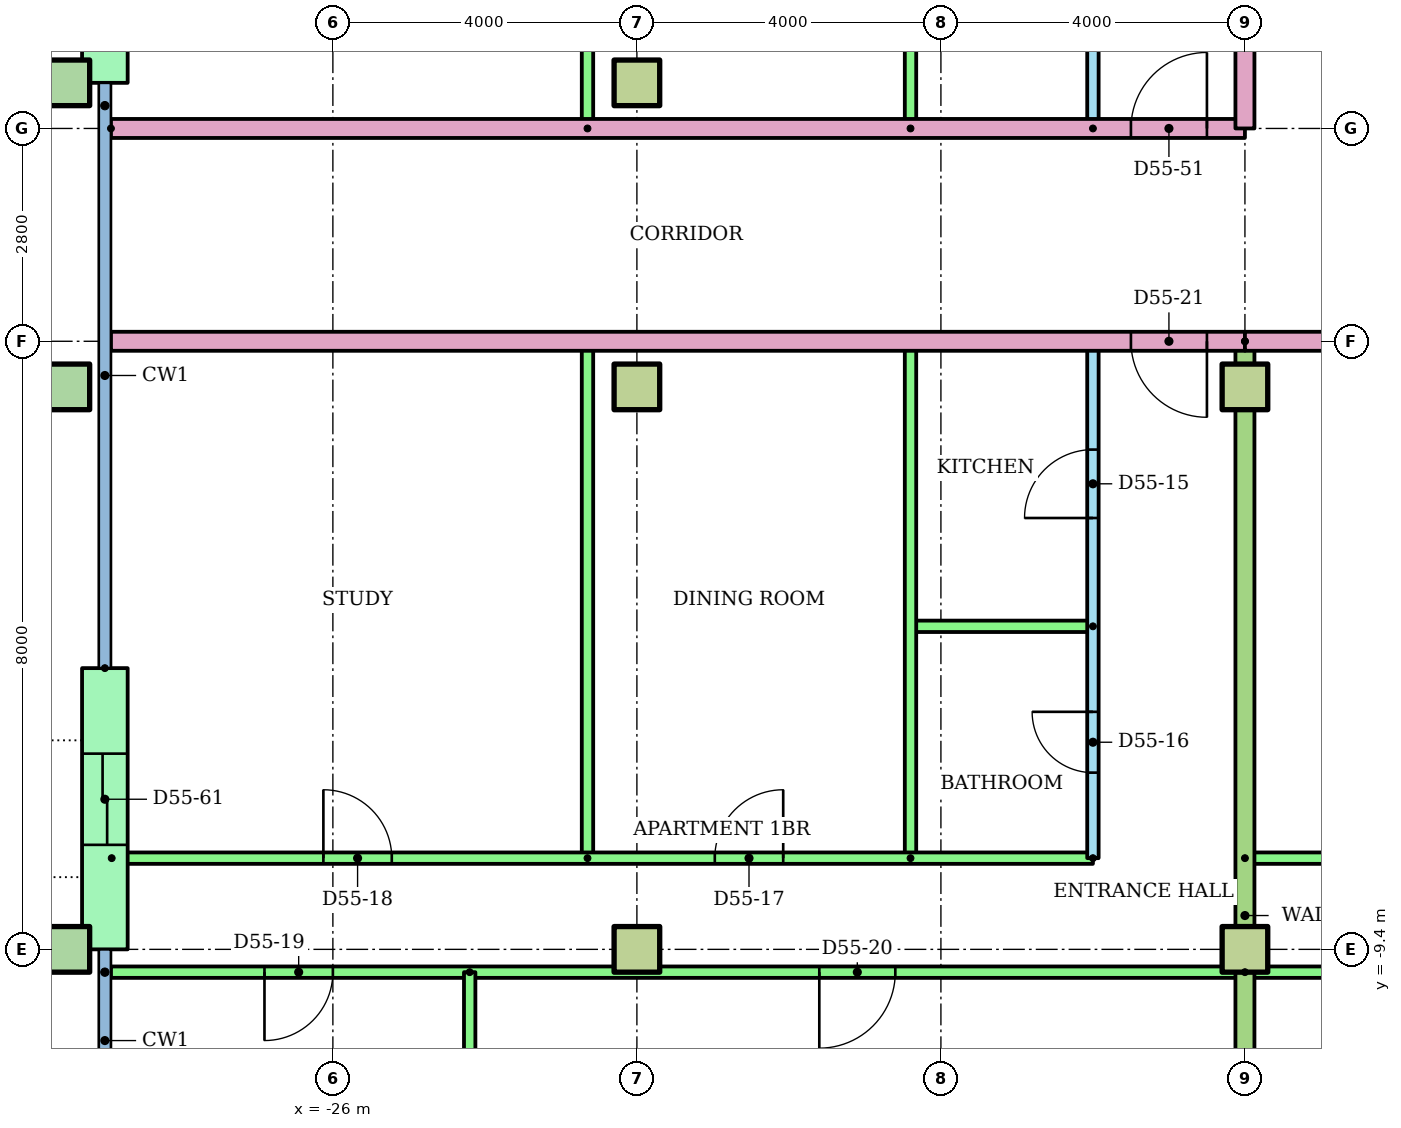
"""IFC4 building model, lengths in metres.
Left out: names, types, materials, properties, quantities, classifications, styles, units other than length and angle.
Written with IfcOpenShell. Run it as: python <this file> out.ifc"""

import sys

from ifc_helpers import new_model, si_unit, direction, frame, frame_2d, origin, origin_2d, place, context, subcontext, project, spatial, rectangle, hollow_rectangle, extrude, element, fill, save


model = new_model("IFC4")
c1 = context("Model", 3, precision=1e-05, world=origin(), true_north=direction((0.0, 1.0)))
c2 = subcontext(c1, "Body", "Model", "MODEL_VIEW")
j1 = project(units=[si_unit("LENGTHUNIT", "METRE"), si_unit("PLANEANGLEUNIT", "RADIAN")], contexts=[c1])
p1 = place(None, origin())
s1 = spatial("IfcSite", under=j1, at=p1, CompositionType="ELEMENT")
p2 = place(p1, origin())
s2 = spatial("IfcBuilding", under=s1, at=p2, CompositionType="ELEMENT")
p3 = place(p2, frame((0.0, 0.0, 214.0)))
s3 = spatial("IfcBuildingStorey", under=s2, at=p3, CompositionType="ELEMENT", Elevation=214.0)
p4 = place(p3, frame((-29.5, -9.4, 0.0)))
e1 = element("IfcColumn", 1, at=p4, inside=s3, PredefinedType="COLUMN", context=c2, shape_type="SweptSolid", body=[
    extrude(hollow_rectangle(XDim=0.6, YDim=0.6, WallThickness=0.03, at=origin_2d()), origin(), (0.0, 0.0, 1.0), 3.2),
])
for number, where in (
    (2, (-22.0, -9.4, 0.0)),
    (3, (-14.0, -9.4, 0.0)),
):
    element("IfcColumn", number, at=place(p3, frame(where)), inside=s3, PredefinedType="COLUMN", context=c2, shape_type="SweptSolid", body=[
        extrude(rectangle(XDim=0.6, YDim=0.6, at=origin_2d()), origin(), (0.0, 0.0, 1.0), 3.2),
    ])
p5 = place(p3, frame((-29.5, -2.0, 0.0)))
e4 = element("IfcColumn", 4, at=p5, inside=s3, PredefinedType="COLUMN", context=c2, shape_type="SweptSolid", body=[
    extrude(hollow_rectangle(XDim=0.6, YDim=0.6, WallThickness=0.03, at=origin_2d()), origin(), (0.0, 0.0, 1.0), 3.2),
])
for number, where in (
    (5, (-22.0, -2.0, 0.0)),
    (6, (-14.0, -2.0, 0.0)),
):
    element("IfcColumn", number, at=place(p3, frame(where)), inside=s3, PredefinedType="COLUMN", context=c2, shape_type="SweptSolid", body=[
        extrude(rectangle(XDim=0.6, YDim=0.6, at=origin_2d()), origin(), (0.0, 0.0, 1.0), 3.2),
    ])
p6 = place(p3, frame((-29.5, 2.0, 0.0)))
e7 = element("IfcColumn", 7, at=p6, inside=s3, PredefinedType="COLUMN", context=c2, shape_type="SweptSolid", body=[
    extrude(hollow_rectangle(XDim=0.6, YDim=0.6, WallThickness=0.03, at=origin_2d()), origin(), (0.0, 0.0, 1.0), 3.2),
])
p7 = place(p3, frame((-22.0, 2.0, 0.0)))
e8 = element("IfcColumn", 8, at=p7, inside=s3, PredefinedType="COLUMN", context=c2, shape_type="SweptSolid", body=[
    extrude(rectangle(XDim=0.6, YDim=0.6, at=origin_2d()), origin(), (0.0, 0.0, 1.0), 3.2),
])
p8 = place(p3, frame((-29.0, 6.5, 0.0), z_axis=(0.0, 0.0, 1.0), x_axis=(0.0, -1.0, 0.0)))
e9 = element("IfcWall", 9, at=p8, inside=s3, PredefinedType="STANDARD", context=c2, shape_type="SweptSolid", body=[
    extrude(rectangle(XDim=4.5, YDim=0.6, at=frame_2d((2.25, 0.0))), origin(), (0.0, 0.0, 1.0), 2.92),
])
p9 = place(p8, frame((1.65, 0.0, 0.0)))
e10 = element("IfcOpeningElement", 10, at=p9, cuts=e9, PredefinedType="OPENING", context=c2, shape_type="SweptSolid", body=[
    extrude(rectangle(XDim=1.2, YDim=2.1, at=frame_2d((0.6, 1.05))), frame((0.0, 0.31, 0.0), z_axis=(0.0, -1.0, 0.0), x_axis=(1.0, 0.0, 0.0)), (0.0, 0.0, 1.0), 0.62),
])
p10 = place(p3, frame((-29.0, -5.7, 0.0), z_axis=(0.0, 0.0, 1.0), x_axis=(0.0, -1.0, 0.0)))
e11 = element("IfcWall", 11, at=p10, inside=s3, PredefinedType="STANDARD", context=c2, shape_type="SweptSolid", body=[
    extrude(rectangle(XDim=3.7, YDim=0.6, at=frame_2d((1.85, 0.0))), origin(), (0.0, 0.0, 1.0), 2.92),
])
p11 = place(p10, frame((1.125, 0.0, 0.0)))
e12 = element("IfcOpeningElement", 12, at=p11, cuts=e11, PredefinedType="OPENING", context=c2, shape_type="SweptSolid", body=[
    extrude(rectangle(XDim=1.2, YDim=2.1, at=frame_2d((0.6, 1.05))), frame((0.0, 0.31, 0.0), z_axis=(0.0, -1.0, 0.0), x_axis=(1.0, 0.0, 0.0)), (0.0, 0.0, 1.0), 0.62),
])
p12 = place(p3, frame((-16.0, -8.2, 0.0), z_axis=(0.0, 0.0, 1.0), x_axis=(0.0, 1.0, 0.0)))
e13 = element("IfcWall", 13, at=p12, inside=s3, PredefinedType="PARTITIONING", context=c2, shape_type="SweptSolid", body=[
    extrude(rectangle(XDim=6.8, YDim=0.15, at=frame_2d((3.4, 0.0))), origin(), (0.0, 0.0, 1.0), 2.4),
])
p13 = place(p12, frame((4.475, 0.0, 0.0)))
e14 = element("IfcOpeningElement", 14, at=p13, cuts=e13, PredefinedType="OPENING", context=c2, shape_type="SweptSolid", body=[
    extrude(rectangle(XDim=0.9, YDim=2.1, at=frame_2d((0.45, 1.05))), frame((0.0, 0.085, 0.0), z_axis=(0.0, -1.0, 0.0), x_axis=(1.0, 0.0, 0.0)), (0.0, 0.0, 1.0), 0.17),
])
p14 = place(p12, frame((1.125, 0.0, 0.0)))
e15 = element("IfcOpeningElement", 15, at=p14, cuts=e13, PredefinedType="OPENING", context=c2, shape_type="SweptSolid", body=[
    extrude(rectangle(XDim=0.8, YDim=2.1, at=frame_2d((0.4, 1.05))), frame((0.0, 0.085, 0.0), z_axis=(0.0, -1.0, 0.0), x_axis=(1.0, 0.0, 0.0)), (0.0, 0.0, 1.0), 0.17),
])
p15 = place(p3, frame((-16.0, -5.15, 0.0), z_axis=(0.0, 0.0, 1.0), x_axis=(-1.0, 0.0, 0.0)))
e16 = element("IfcWall", 16, at=p15, inside=s3, PredefinedType="PARTITIONING", context=c2, shape_type="SweptSolid", body=[
    extrude(rectangle(XDim=2.4, YDim=0.15, at=frame_2d((1.2, 0.0))), origin(), (0.0, 0.0, 1.0), 2.4),
])
for number, where, z_axis, x_axis in (
    (17, (-18.4, -8.2, 0.0), (0.0, 0.0, 1.0), (0.0, 1.0, 0.0)),
    (18, (-22.65, -8.2, 0.0), (0.0, 0.0, 1.0), (0.0, 1.0, 0.0)),
):
    element("IfcWall", number, at=place(p3, frame(where, z_axis=z_axis, x_axis=x_axis)), inside=s3, PredefinedType="PARTITIONING", context=c2, shape_type="SweptSolid", body=[
        extrude(rectangle(XDim=6.8, YDim=0.15, at=frame_2d((3.4, 0.0))), origin(), (0.0, 0.0, 1.0), 2.4),
    ])
p16 = place(p3, frame((-28.91, -8.2, 0.0)))
e19 = element("IfcWall", 19, at=p16, inside=s3, PredefinedType="PARTITIONING", context=c2, shape_type="SweptSolid", body=[
    extrude(rectangle(XDim=12.91, YDim=0.15, at=frame_2d((6.455, 0.0))), origin(), (0.0, 0.0, 1.0), 2.4),
])
p17 = place(p16, frame((7.935, 0.0, 0.0)))
e20 = element("IfcOpeningElement", 20, at=p17, cuts=e19, PredefinedType="OPENING", context=c2, shape_type="SweptSolid", body=[
    extrude(rectangle(XDim=0.9, YDim=2.1, at=frame_2d((0.45, 1.05))), frame((0.0, 0.085, 0.0), z_axis=(0.0, -1.0, 0.0), x_axis=(1.0, 0.0, 0.0)), (0.0, 0.0, 1.0), 0.17),
])
p18 = place(p16, frame((2.785, 0.0, 0.0)))
e21 = element("IfcOpeningElement", 21, at=p18, cuts=e19, PredefinedType="OPENING", context=c2, shape_type="SweptSolid", body=[
    extrude(rectangle(XDim=0.9, YDim=2.1, at=frame_2d((0.45, 1.05))), frame((0.0, 0.085, 0.0), z_axis=(0.0, -1.0, 0.0), x_axis=(1.0, 0.0, 0.0)), (0.0, 0.0, 1.0), 0.17),
])
p19 = place(p3, frame((-14.0, -9.7, 0.0), z_axis=(0.0, 0.0, 1.0), x_axis=(-1.0, 0.0, 0.0)))
e22 = element("IfcWall", 22, at=p19, inside=s3, PredefinedType="PARTITIONING", context=c2, shape_type="SweptSolid", body=[
    extrude(rectangle(XDim=14.92, YDim=0.15, at=frame_2d((7.46, 0.0))), origin(), (0.0, 0.0, 1.0), 2.4),
])
p20 = place(p19, frame((12.0, 0.0, 0.0)))
e23 = element("IfcOpeningElement", 23, at=p20, cuts=e22, PredefinedType="OPENING", context=c2, shape_type="SweptSolid", body=[
    extrude(rectangle(XDim=0.9, YDim=2.1, at=frame_2d((0.45, 1.05))), frame((0.0, 0.085, 0.0), z_axis=(0.0, -1.0, 0.0), x_axis=(1.0, 0.0, 0.0)), (0.0, 0.0, 1.0), 0.17),
])
p21 = place(p19, frame((4.6, 0.0, 0.0)))
e24 = element("IfcOpeningElement", 24, at=p21, cuts=e22, PredefinedType="OPENING", context=c2, shape_type="SweptSolid", body=[
    extrude(rectangle(XDim=1.0, YDim=2.1, at=frame_2d((0.5, 1.05))), frame((0.0, 0.085, 0.0), z_axis=(0.0, -1.0, 0.0), x_axis=(1.0, 0.0, 0.0)), (0.0, 0.0, 1.0), 0.17),
])
p22 = place(p3, frame((-24.2, -9.7, 0.0), z_axis=(0.0, 0.0, 1.0), x_axis=(0.0, -1.0, 0.0)))
e25 = element("IfcWall", 25, at=p22, inside=s3, PredefinedType="PARTITIONING", context=c2, shape_type="SweptSolid", body=[
    extrude(rectangle(XDim=5.02, YDim=0.15, at=frame_2d((2.51, 0.0))), origin(), (0.0, 0.0, 1.0), 2.4),
])
p23 = place(p3, frame((-14.0, -8.2, 0.0)))
e26 = element("IfcWall", 26, at=p23, inside=s3, PredefinedType="PARTITIONING", context=c2, shape_type="SweptSolid", body=[
    extrude(rectangle(XDim=22.0, YDim=0.15, at=frame_2d((11.0, 0.0))), origin(), (0.0, 0.0, 1.0), 2.4),
])
p24 = place(p23, frame((14.624, 0.0, 0.0)))
e27 = element("IfcOpeningElement", 27, at=p24, cuts=e26, PredefinedType="OPENING", context=c2, shape_type="SweptSolid", body=[
    extrude(rectangle(XDim=0.9, YDim=2.1, at=frame_2d((0.45, 1.05))), frame((0.0, 0.085, 0.0), z_axis=(0.0, -1.0, 0.0), x_axis=(1.0, 0.0, 0.0)), (0.0, 0.0, 1.0), 0.17),
])
p25 = place(p23, frame((8.476, 0.0, 0.0)))
e28 = element("IfcOpeningElement", 28, at=p25, cuts=e26, PredefinedType="OPENING", context=c2, shape_type="SweptSolid", body=[
    extrude(rectangle(XDim=0.9, YDim=2.1, at=frame_2d((0.45, 1.05))), frame((0.0, 0.085, 0.0), z_axis=(0.0, -1.0, 0.0), x_axis=(1.0, 0.0, 0.0)), (0.0, 0.0, 1.0), 0.17),
])
p26 = place(p23, frame((1.975, 0.0, 0.0)))
e29 = element("IfcOpeningElement", 29, at=p26, cuts=e26, PredefinedType="OPENING", context=c2, shape_type="SweptSolid", body=[
    extrude(rectangle(XDim=0.9, YDim=2.1, at=frame_2d((0.45, 1.05))), frame((0.0, 0.085, 0.0), z_axis=(0.0, -1.0, 0.0), x_axis=(1.0, 0.0, 0.0)), (0.0, 0.0, 1.0), 0.17),
])
p27 = place(p3, frame((10.0, -9.7, 0.0), z_axis=(0.0, 0.0, 1.0), x_axis=(-1.0, 0.0, 0.0)))
e30 = element("IfcWall", 30, at=p27, inside=s3, PredefinedType="PARTITIONING", context=c2, shape_type="SweptSolid", body=[
    extrude(rectangle(XDim=24.0, YDim=0.15, at=frame_2d((12.0, 0.0))), origin(), (0.0, 0.0, 1.0), 2.4),
])
p28 = place(p27, frame((21.55, 0.0, 0.0)))
e31 = element("IfcOpeningElement", 31, at=p28, cuts=e30, PredefinedType="OPENING", context=c2, shape_type="SweptSolid", body=[
    extrude(rectangle(XDim=0.9, YDim=2.1, at=frame_2d((0.45, 1.05))), frame((0.0, 0.085, 0.0), z_axis=(0.0, -1.0, 0.0), x_axis=(1.0, 0.0, 0.0)), (0.0, 0.0, 1.0), 0.17),
])
p29 = place(p27, frame((17.55, 0.0, 0.0)))
e32 = element("IfcOpeningElement", 32, at=p29, cuts=e30, PredefinedType="OPENING", context=c2, shape_type="SweptSolid", body=[
    extrude(rectangle(XDim=0.9, YDim=2.1, at=frame_2d((0.45, 1.05))), frame((0.0, 0.085, 0.0), z_axis=(0.0, -1.0, 0.0), x_axis=(1.0, 0.0, 0.0)), (0.0, 0.0, 1.0), 0.17),
])
p30 = place(p27, frame((11.5, 0.0, 0.0)))
e33 = element("IfcOpeningElement", 33, at=p30, cuts=e30, PredefinedType="OPENING", context=c2, shape_type="SweptSolid", body=[
    extrude(rectangle(XDim=1.0, YDim=2.1, at=frame_2d((0.5, 1.05))), frame((0.0, 0.085, 0.0), z_axis=(0.0, -1.0, 0.0), x_axis=(1.0, 0.0, 0.0)), (0.0, 0.0, 1.0), 0.17),
])
p31 = place(p27, frame((5.55, 0.0, 0.0)))
e34 = element("IfcOpeningElement", 34, at=p31, cuts=e30, PredefinedType="OPENING", context=c2, shape_type="SweptSolid", body=[
    extrude(rectangle(XDim=0.9, YDim=2.1, at=frame_2d((0.45, 1.05))), frame((0.0, 0.085, 0.0), z_axis=(0.0, -1.0, 0.0), x_axis=(1.0, 0.0, 0.0)), (0.0, 0.0, 1.0), 0.17),
])
p32 = place(p27, frame((1.55, 0.0, 0.0)))
e35 = element("IfcOpeningElement", 35, at=p32, cuts=e30, PredefinedType="OPENING", context=c2, shape_type="SweptSolid", body=[
    extrude(rectangle(XDim=0.9, YDim=2.1, at=frame_2d((0.45, 1.05))), frame((0.0, 0.085, 0.0), z_axis=(0.0, -1.0, 0.0), x_axis=(1.0, 0.0, 0.0)), (0.0, 0.0, 1.0), 0.17),
])
p33 = place(p3, frame((-14.0, -1.4, 0.0), z_axis=(0.0, 0.0, 1.0), x_axis=(0.0, -1.0, 0.0)))
e36 = element("IfcWall", 36, at=p33, inside=s3, PredefinedType="PARTITIONING", context=c2, shape_type="SweptSolid", body=[
    extrude(rectangle(XDim=15.11, YDim=0.25, at=frame_2d((7.555, 0.0))), origin(), (0.0, 0.0, 1.0), 2.4),
])
p34 = place(p3, frame((-14.0, -1.4, 0.0), z_axis=(0.0, 0.0, 1.0), x_axis=(-1.0, 0.0, 0.0)))
e37 = element("IfcWall", 37, at=p34, inside=s3, PredefinedType="PARTITIONING", context=c2, shape_type="SweptSolid", body=[
    extrude(rectangle(XDim=14.92, YDim=0.25, at=frame_2d((7.46, 0.0))), origin(), (0.0, 0.0, 1.0), 2.4),
])
p35 = place(p34, frame((0.5, 0.0, 0.0)))
e38 = element("IfcOpeningElement", 38, at=p35, cuts=e37, PredefinedType="OPENING", context=c2, shape_type="SweptSolid", body=[
    extrude(rectangle(XDim=1.0, YDim=2.1, at=frame_2d((0.5, 1.05))), frame((0.0, 0.135, 0.0), z_axis=(0.0, -1.0, 0.0), x_axis=(1.0, 0.0, 0.0)), (0.0, 0.0, 1.0), 0.27),
])
p36 = place(p3, frame((-16.0, 1.4, 0.0), z_axis=(0.0, 0.0, 1.0), x_axis=(0.0, 1.0, 0.0)))
e39 = element("IfcWall", 39, at=p36, inside=s3, PredefinedType="PARTITIONING", context=c2, shape_type="SweptSolid", body=[
    extrude(rectangle(XDim=9.2, YDim=0.15, at=frame_2d((4.6, 0.0))), origin(), (0.0, 0.0, 1.0), 2.4),
])
p37 = place(p36, frame((2.05, 0.0, 0.0)))
e40 = element("IfcOpeningElement", 40, at=p37, cuts=e39, PredefinedType="OPENING", context=c2, shape_type="SweptSolid", body=[
    extrude(rectangle(XDim=0.9, YDim=2.1, at=frame_2d((0.45, 1.05))), frame((0.0, 0.085, 0.0), z_axis=(0.0, -1.0, 0.0), x_axis=(1.0, 0.0, 0.0)), (0.0, 0.0, 1.0), 0.17),
])
p38 = place(p36, frame((6.7, 0.0, 0.0)))
e41 = element("IfcOpeningElement", 41, at=p38, cuts=e39, PredefinedType="OPENING", context=c2, shape_type="SweptSolid", body=[
    extrude(rectangle(XDim=0.8, YDim=2.1, at=frame_2d((0.4, 1.05))), frame((0.0, 0.085, 0.0), z_axis=(0.0, -1.0, 0.0), x_axis=(1.0, 0.0, 0.0)), (0.0, 0.0, 1.0), 0.17),
])
for number, where, z_axis, x_axis in (
    (42, (-18.4, 1.4, 0.0), (0.0, 0.0, 1.0), (0.0, 1.0, 0.0)),
    (43, (-22.65, 1.4, 0.0), (0.0, 0.0, 1.0), (0.0, 1.0, 0.0)),
):
    element("IfcWall", number, at=place(p3, frame(where, z_axis=z_axis, x_axis=x_axis)), inside=s3, PredefinedType="PARTITIONING", context=c2, shape_type="SweptSolid", body=[
        extrude(rectangle(XDim=9.2, YDim=0.15, at=frame_2d((4.6, 0.0))), origin(), (0.0, 0.0, 1.0), 2.4),
    ])
p39 = place(p3, frame((-28.92, 1.4, 0.0)))
e44 = element("IfcWall", 44, at=p39, inside=s3, PredefinedType="PARTITIONING", context=c2, shape_type="SweptSolid", body=[
    extrude(rectangle(XDim=14.92, YDim=0.25, at=frame_2d((7.46, 0.0))), origin(), (0.0, 0.0, 1.0), 2.4),
])
p40 = place(p39, frame((13.42, 0.0, 0.0)))
e45 = element("IfcOpeningElement", 45, at=p40, cuts=e44, PredefinedType="OPENING", context=c2, shape_type="SweptSolid", body=[
    extrude(rectangle(XDim=1.0, YDim=2.1, at=frame_2d((0.5, 1.05))), frame((0.0, 0.135, 0.0), z_axis=(0.0, -1.0, 0.0), x_axis=(1.0, 0.0, 0.0)), (0.0, 0.0, 1.0), 0.27),
])
p41 = place(p3, frame((14.0, -1.4, 0.0), z_axis=(0.0, 0.0, 1.0), x_axis=(-1.0, 0.0, 0.0)))
e46 = element("IfcWall", 46, at=p41, inside=s3, PredefinedType="PARTITIONING", context=c2, shape_type="SweptSolid", body=[
    extrude(rectangle(XDim=28.0, YDim=0.25, at=frame_2d((14.0, 0.0))), origin(), (0.0, 0.0, 1.0), 2.4),
])
p42 = place(p41, frame((4.5, 0.0, 0.0)))
e47 = element("IfcOpeningElement", 47, at=p42, cuts=e46, PredefinedType="OPENING", context=c2, shape_type="SweptSolid", body=[
    extrude(rectangle(XDim=1.0, YDim=2.1, at=frame_2d((0.5, 1.05))), frame((0.0, 0.135, 0.0), z_axis=(0.0, -1.0, 0.0), x_axis=(1.0, 0.0, 0.0)), (0.0, 0.0, 1.0), 0.27),
])
p43 = place(p41, frame((2.5, 0.0, 0.0)))
e48 = element("IfcOpeningElement", 48, at=p43, cuts=e46, PredefinedType="OPENING", context=c2, shape_type="SweptSolid", body=[
    extrude(rectangle(XDim=1.0, YDim=2.1, at=frame_2d((0.5, 1.05))), frame((0.0, 0.135, 0.0), z_axis=(0.0, -1.0, 0.0), x_axis=(1.0, 0.0, 0.0)), (0.0, 0.0, 1.0), 0.27),
])
p44 = place(p3, frame((-14.0, 3.0, 0.0), z_axis=(0.0, 0.0, 1.0), x_axis=(0.0, -1.0, 0.0)))
e49 = element("IfcWall", 49, at=p44, inside=s3, PredefinedType="PARTITIONING", context=c2, shape_type="SweptSolid", body=[
    extrude(rectangle(XDim=1.6, YDim=0.25, at=frame_2d((0.8, 0.0))), origin(), (0.0, 0.0, 1.0), 2.4),
])
p45 = place(p13, origin())
e50 = element("IfcDoor", 50, at=p45, inside=s3, OperationType="SINGLE_SWING_LEFT", PredefinedType="DOOR", context=c2, shape_type="SweptSolid", body=[
    extrude(rectangle(XDim=0.9, YDim=2.1, at=frame_2d((0.45, 1.05))), frame((0.0, 0.025, 0.0), z_axis=(0.0, -1.0, 0.0), x_axis=(1.0, 0.0, 0.0)), (0.0, 0.0, 1.0), 0.05),
])
fill(e14, e50)
p46 = place(p14, origin())
e51 = element("IfcDoor", 51, at=p46, inside=s3, OperationType="SINGLE_SWING_RIGHT", PredefinedType="DOOR", context=c2, shape_type="SweptSolid", body=[
    extrude(rectangle(XDim=0.8, YDim=2.1, at=frame_2d((0.4, 1.05))), frame((0.0, 0.025, 0.0), z_axis=(0.0, -1.0, 0.0), x_axis=(1.0, 0.0, 0.0)), (0.0, 0.0, 1.0), 0.05),
])
fill(e15, e51)
p47 = place(p17, origin())
e52 = element("IfcDoor", 52, at=p47, inside=s3, OperationType="SINGLE_SWING_RIGHT", PredefinedType="DOOR", context=c2, shape_type="SweptSolid", body=[
    extrude(rectangle(XDim=0.9, YDim=2.1, at=frame_2d((0.45, 1.05))), frame((0.0, 0.025, 0.0), z_axis=(0.0, -1.0, 0.0), x_axis=(1.0, 0.0, 0.0)), (0.0, 0.0, 1.0), 0.05),
])
fill(e20, e52)
p48 = place(p18, origin())
e53 = element("IfcDoor", 53, at=p48, inside=s3, OperationType="SINGLE_SWING_LEFT", PredefinedType="DOOR", context=c2, shape_type="SweptSolid", body=[
    extrude(rectangle(XDim=0.9, YDim=2.1, at=frame_2d((0.45, 1.05))), frame((0.0, 0.025, 0.0), z_axis=(0.0, -1.0, 0.0), x_axis=(1.0, 0.0, 0.0)), (0.0, 0.0, 1.0), 0.05),
])
fill(e21, e53)
p49 = place(p20, origin())
e54 = element("IfcDoor", 54, at=p49, inside=s3, OperationType="SINGLE_SWING_RIGHT", PredefinedType="DOOR", context=c2, shape_type="SweptSolid", body=[
    extrude(rectangle(XDim=0.9, YDim=2.1, at=frame_2d((0.45, 1.05))), frame((0.0, 0.025, 0.0), z_axis=(0.0, -1.0, 0.0), x_axis=(1.0, 0.0, 0.0)), (0.0, 0.0, 1.0), 0.05),
])
fill(e23, e54)
p50 = place(p21, origin())
e55 = element("IfcDoor", 55, at=p50, inside=s3, OperationType="SINGLE_SWING_RIGHT", PredefinedType="DOOR", context=c2, shape_type="SweptSolid", body=[
    extrude(rectangle(XDim=1.0, YDim=2.1, at=frame_2d((0.5, 1.05))), frame((0.0, 0.025, 0.0), z_axis=(0.0, -1.0, 0.0), x_axis=(1.0, 0.0, 0.0)), (0.0, 0.0, 1.0), 0.05),
])
fill(e24, e55)
p51 = place(p35, origin())
e56 = element("IfcDoor", 56, at=p51, inside=s3, OperationType="SINGLE_SWING_LEFT", PredefinedType="DOOR", context=c2, shape_type="SweptSolid", body=[
    extrude(rectangle(XDim=1.0, YDim=2.1, at=frame_2d((0.5, 1.05))), frame((0.0, 0.025, 0.0), z_axis=(0.0, -1.0, 0.0), x_axis=(1.0, 0.0, 0.0)), (0.0, 0.0, 1.0), 0.05),
])
fill(e38, e56)
p52 = place(p40, origin())
e57 = element("IfcDoor", 57, at=p52, inside=s3, OperationType="SINGLE_SWING_RIGHT", PredefinedType="DOOR", context=c2, shape_type="SweptSolid", body=[
    extrude(rectangle(XDim=1.0, YDim=2.1, at=frame_2d((0.5, 1.05))), frame((0.0, 0.025, 0.0), z_axis=(0.0, -1.0, 0.0), x_axis=(1.0, 0.0, 0.0)), (0.0, 0.0, 1.0), 0.05),
])
fill(e45, e57)
p53 = place(p11, origin())
e58 = element("IfcDoor", 58, at=p53, inside=s3, OperationType="SLIDING_TO_LEFT", PredefinedType="DOOR", context=c2, shape_type="SweptSolid", body=[
    extrude(rectangle(XDim=1.2, YDim=2.1, at=frame_2d((0.6, 1.05))), frame((0.0, 0.025, 0.0), z_axis=(0.0, -1.0, 0.0), x_axis=(1.0, 0.0, 0.0)), (0.0, 0.0, 1.0), 0.05),
])
fill(e12, e58)
save(model, sys.argv[1])
